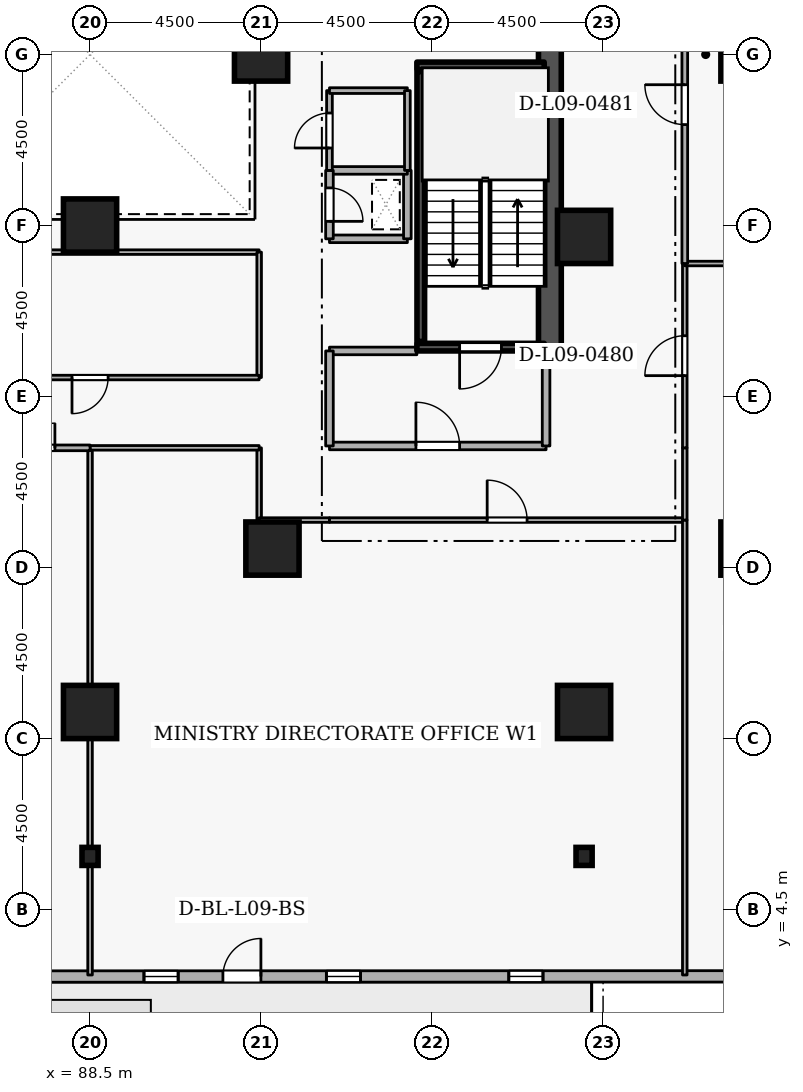
"""IFC4 building model, lengths in metres.
Left out: names, types, materials, properties, quantities, classifications, styles, units other than length and angle.
Written with IfcOpenShell. Run it as: python <this file> out.ifc"""

import sys

from ifc_helpers import new_model, si_unit, direction, frame, frame_2d, origin, origin_2d, place, context, subcontext, project, spatial, rectangle, i_section, extrude, element, fill, save


model = new_model("IFC4")
c1 = context("Model", 3, precision=1e-05, world=origin(), true_north=direction((0.0, 1.0)))
c2 = subcontext(c1, "Body", "Model", "MODEL_VIEW")
j1 = project(units=[si_unit("LENGTHUNIT", "METRE"), si_unit("PLANEANGLEUNIT", "RADIAN")], contexts=[c1])
p1 = place(None, origin())
s1 = spatial("IfcSite", under=j1, at=p1, CompositionType="ELEMENT")
p2 = place(p1, origin())
s2 = spatial("IfcBuilding", under=s1, at=p2, CompositionType="ELEMENT")
p3 = place(p2, frame((0.0, 0.0, 38.7)))
s3 = spatial("IfcBuildingStorey", under=s2, at=p3, CompositionType="ELEMENT", Elevation=38.7)
p4 = place(p3, frame((100.6, 19.2, 0.0), z_axis=(0.0, 0.0, 1.0), x_axis=(0.0, 1.0, 0.0)))
e1 = element("IfcWall", 1, at=p4, inside=s3, PredefinedType="SHEAR", context=c2, shape_type="SweptSolid", body=[
    extrude(rectangle(XDim=15.6, YDim=0.6, at=frame_2d((7.8, 0.0))), origin(), (0.0, 0.0, 1.0), 3.6),
])
for number, where, z_axis, x_axis in (
    (2, (105.8, 14.0, 0.0), (0.0, 0.0, 1.0), (1.0, 0.0, 0.0)),
    (3, (105.8, 27.0, 0.0), (0.0, 0.0, 1.0), (1.0, 0.0, 0.0)),
    (4, (101.5, 9.7, 0.0), (0.0, 0.0, 1.0), (1.0, 0.0, 0.0)),
    (5, (88.5, 9.7, 0.0), (0.0, 0.0, 1.0), (1.0, 0.0, 0.0)),
    (6, (93.3, 14.0, 0.0), (0.0, 0.0, 1.0), (1.0, 0.0, 0.0)),
    (7, (101.5, 22.2, 0.0), (0.0, 0.0, 1.0), (1.0, 0.0, 0.0)),
    (8, (93.0, 27.0, 0.0), (0.0, 0.0, 1.0), (1.0, 0.0, 0.0)),
    (9, (88.5, 22.5, 0.0), (0.0, 0.0, 1.0), (1.0, 0.0, 0.0)),
):
    element("IfcColumn", number, at=place(p3, frame(where, z_axis=z_axis, x_axis=x_axis)), inside=s3, PredefinedType="COLUMN", context=c2, shape_type="SweptSolid", body=[
        extrude(rectangle(XDim=1.4, YDim=1.4, at=origin_2d()), origin(), (0.0, 0.0, 1.0), 3.6),
    ])
for number, where, z_axis, x_axis in (
    (10, (101.5, 5.9, 0.0), (0.0, 0.0, 1.0), (1.0, 0.0, 0.0)),
    (11, (88.5, 5.9, 0.0), (0.0, 0.0, 1.0), (1.0, 0.0, 0.0)),
):
    element("IfcColumn", number, at=place(p3, frame(where, z_axis=z_axis, x_axis=x_axis)), inside=s3, PredefinedType="COLUMN", context=c2, shape_type="SweptSolid", body=[
        extrude(i_section(OverallWidth=0.424, OverallDepth=0.475, WebThickness=0.048, FlangeThickness=0.077, FilletRadius=0.015, at=origin_2d()), origin(), (0.0, 0.0, 1.0), 3.6),
    ])
p5 = place(p3, frame((72.819, 2.735, 0.0), z_axis=(0.0, 0.0, 1.0), x_axis=(0.999999969775, 0.000245864205, 0.0)))
e12 = element("IfcWall", 12, at=p5, inside=s3, PredefinedType="STANDARD", context=c2, shape_type="SweptSolid", body=[
    extrude(rectangle(XDim=34.755, YDim=0.3, at=frame_2d((17.377, 0.0))), origin(), (0.0, 0.0, 1.0), 2.7),
])
p6 = place(p5, frame((19.177, 0.0, 0.0)))
e13 = element("IfcOpeningElement", 13, at=p6, cuts=e12, PredefinedType="OPENING", context=c2, shape_type="SweptSolid", body=[
    extrude(rectangle(XDim=1.0, YDim=2.08, at=frame_2d((0.5, 1.04))), frame((0.0, 0.16, 0.0), z_axis=(0.0, -1.0, 0.0), x_axis=(1.0, 0.0, 0.0)), (0.0, 0.0, 1.0), 0.32),
])
p7 = place(p5, frame((2.7, 0.0, 0.72)))
e14 = element("IfcOpeningElement", 14, at=p7, cuts=e12, PredefinedType="OPENING", context=c2, shape_type="SweptSolid", body=[
    extrude(rectangle(XDim=0.9, YDim=1.75, at=frame_2d((0.45, 0.875))), frame((0.0, 0.16, 0.0), z_axis=(0.0, -1.0, 0.0), x_axis=(1.0, 0.0, 0.0)), (0.0, 0.0, 1.0), 0.32),
])
p8 = place(p5, frame((7.5, 0.0, 0.72)))
e15 = element("IfcOpeningElement", 15, at=p8, cuts=e12, PredefinedType="OPENING", context=c2, shape_type="SweptSolid", body=[
    extrude(rectangle(XDim=0.9, YDim=1.75, at=frame_2d((0.45, 0.875))), frame((0.0, 0.16, 0.0), z_axis=(0.0, -1.0, 0.0), x_axis=(1.0, 0.0, 0.0)), (0.0, 0.0, 1.0), 0.32),
])
p9 = place(p5, frame((17.1, 0.0, 0.72)))
e16 = element("IfcOpeningElement", 16, at=p9, cuts=e12, PredefinedType="OPENING", context=c2, shape_type="SweptSolid", body=[
    extrude(rectangle(XDim=0.9, YDim=1.75, at=frame_2d((0.45, 0.875))), frame((0.0, 0.16, 0.0), z_axis=(0.0, -1.0, 0.0), x_axis=(1.0, 0.0, 0.0)), (0.0, 0.0, 1.0), 0.32),
])
p10 = place(p5, frame((21.9, 0.0, 0.72)))
e17 = element("IfcOpeningElement", 17, at=p10, cuts=e12, PredefinedType="OPENING", context=c2, shape_type="SweptSolid", body=[
    extrude(rectangle(XDim=0.9, YDim=1.75, at=frame_2d((0.45, 0.875))), frame((0.0, 0.16, 0.0), z_axis=(0.0, -1.0, 0.0), x_axis=(1.0, 0.0, 0.0)), (0.0, 0.0, 1.0), 0.32),
])
p11 = place(p5, frame((26.7, 0.0, 0.72)))
e18 = element("IfcOpeningElement", 18, at=p11, cuts=e12, PredefinedType="OPENING", context=c2, shape_type="SweptSolid", body=[
    extrude(rectangle(XDim=0.9, YDim=1.75, at=frame_2d((0.45, 0.875))), frame((0.0, 0.16, 0.0), z_axis=(0.0, -1.0, 0.0), x_axis=(1.0, 0.0, 0.0)), (0.0, 0.0, 1.0), 0.32),
])
p12 = place(p3, frame((100.45, 19.3, 0.0), z_axis=(0.0, 0.0, 1.0), x_axis=(-1.0, 0.0, 0.0)))
e19 = element("IfcWall", 19, at=p12, inside=s3, PredefinedType="SHEAR", context=c2, shape_type="SweptSolid", body=[
    extrude(rectangle(XDim=3.35, YDim=0.2, at=frame_2d((1.675, 0.0))), origin(), (0.0, 0.0, 1.0), 3.6),
])
p13 = place(p12, frame((1.125, 0.0, 0.0)))
e20 = element("IfcOpeningElement", 20, at=p13, cuts=e19, PredefinedType="OPENING", context=c2, shape_type="SweptSolid", body=[
    extrude(rectangle(XDim=1.1, YDim=2.1, at=frame_2d((0.55, 1.05))), frame((0.0, 0.11, 0.0), z_axis=(0.0, -1.0, 0.0), x_axis=(1.0, 0.0, 0.0)), (0.0, 0.0, 1.0), 0.22),
])
p14 = place(p3, frame((97.1, 26.7, 0.0), z_axis=(0.0, 0.0, 1.0), x_axis=(1.0, 0.0, 0.0)))
e21 = element("IfcWall", 21, at=p14, inside=s3, PredefinedType="SHEAR", context=c2, shape_type="SweptSolid", body=[
    extrude(rectangle(XDim=3.35, YDim=0.2, at=frame_2d((1.675, 0.0))), origin(), (0.0, 0.0, 1.0), 3.6),
])
p15 = place(p3, frame((97.203, 26.55, 0.0), z_axis=(0.0, 0.0, 1.0), x_axis=(0.0, -1.0, 0.0)))
e22 = element("IfcWall", 22, at=p15, inside=s3, PredefinedType="SHEAR", context=c2, shape_type="SweptSolid", body=[
    extrude(rectangle(XDim=7.1, YDim=0.2, at=frame_2d((3.55, 0.0))), origin(), (0.0, 0.0, 1.0), 3.6),
])
p16 = place(p3, frame((94.8, 16.7, 0.0), z_axis=(0.0, 0.0, 1.0), x_axis=(1.0, 0.0, 0.0)))
e23 = element("IfcWall", 23, at=p16, inside=s3, PredefinedType="STANDARD", context=c2, shape_type="SweptSolid", body=[
    extrude(rectangle(XDim=5.7, YDim=0.2, at=frame_2d((2.85, 0.0))), origin(), (0.0, 0.0, 1.0), 3.34),
])
p17 = place(p16, frame((2.275, 0.0, 0.0)))
e24 = element("IfcOpeningElement", 24, at=p17, cuts=e23, PredefinedType="OPENING", context=c2, shape_type="SweptSolid", body=[
    extrude(rectangle(XDim=1.15, YDim=2.1, at=frame_2d((0.575, 1.05))), frame((0.0, 0.11, 0.0), z_axis=(0.0, -1.0, 0.0), x_axis=(1.0, 0.0, 0.0)), (0.0, 0.0, 1.0), 0.22),
])
p18 = place(p3, frame((100.5, 16.7, 0.0), z_axis=(0.0, 0.0, 1.0), x_axis=(0.0, 1.0, 0.0)))
e25 = element("IfcWall", 25, at=p18, inside=s3, PredefinedType="STANDARD", context=c2, shape_type="SweptSolid", body=[
    extrude(rectangle(XDim=2.5, YDim=0.2, at=frame_2d((1.25, 0.0))), origin(), (0.0, 0.0, 1.0), 3.34),
])
p19 = place(p3, frame((97.1, 19.2, 0.0), z_axis=(0.0, 0.0, 1.0), x_axis=(-1.0, 0.0, 0.0)))
e26 = element("IfcWall", 26, at=p19, inside=s3, PredefinedType="STANDARD", context=c2, shape_type="SweptSolid", body=[
    extrude(rectangle(XDim=2.3, YDim=0.2, at=frame_2d((1.15, 0.0))), origin(), (0.0, 0.0, 1.0), 2.545),
])
p20 = place(p3, frame((94.8, 19.2, 0.0), z_axis=(0.0, 0.0, 1.0), x_axis=(0.0, -1.0, 0.0)))
e27 = element("IfcWall", 27, at=p20, inside=s3, PredefinedType="STANDARD", context=c2, shape_type="SweptSolid", body=[
    extrude(rectangle(XDim=2.5, YDim=0.2, at=frame_2d((1.25, 0.0))), origin(), (0.0, 0.0, 1.0), 3.34),
])
p21 = place(p3, frame((94.8, 22.15, 0.0), z_axis=(0.0, 0.0, 1.0), x_axis=(1.0, 0.0, 0.0)))
e28 = element("IfcWall", 28, at=p21, inside=s3, PredefinedType="STANDARD", context=c2, shape_type="SweptSolid", body=[
    extrude(rectangle(XDim=2.05, YDim=0.2, at=frame_2d((1.025, 0.0))), origin(), (0.0, 0.0, 1.0), 3.34),
])
p22 = place(p3, frame((96.85, 22.15, 0.0), z_axis=(0.0, 0.0, 1.0), x_axis=(0.0, 1.0, 0.0)))
e29 = element("IfcWall", 29, at=p22, inside=s3, PredefinedType="STANDARD", context=c2, shape_type="SweptSolid", body=[
    extrude(rectangle(XDim=1.8, YDim=0.2, at=frame_2d((0.9, 0.0))), origin(), (0.0, 0.0, 1.0), 3.34),
])
p23 = place(p3, frame((96.85, 23.95, 0.0), z_axis=(0.0, 0.0, 1.0), x_axis=(-1.0, 0.0, 0.0)))
e30 = element("IfcWall", 30, at=p23, inside=s3, PredefinedType="STANDARD", context=c2, shape_type="SweptSolid", body=[
    extrude(rectangle(XDim=2.05, YDim=0.2, at=frame_2d((1.025, 0.0))), origin(), (0.0, 0.0, 1.0), 3.34),
])
p24 = place(p3, frame((94.8, 23.95, 0.0), z_axis=(0.0, 0.0, 1.0), x_axis=(0.0, -1.0, 0.0)))
e31 = element("IfcWall", 31, at=p24, inside=s3, PredefinedType="STANDARD", context=c2, shape_type="SweptSolid", body=[
    extrude(rectangle(XDim=1.8, YDim=0.2, at=frame_2d((0.9, 0.0))), origin(), (0.0, 0.0, 1.0), 3.34),
])
p25 = place(p24, frame((0.46, 0.0, 0.0)))
e32 = element("IfcOpeningElement", 32, at=p25, cuts=e31, PredefinedType="OPENING", context=c2, shape_type="SweptSolid", body=[
    extrude(rectangle(XDim=0.88, YDim=2.04, at=frame_2d((0.44, 1.02))), frame((0.0, 0.11, 0.0), z_axis=(0.0, -1.0, 0.0), x_axis=(1.0, 0.0, 0.0)), (0.0, 0.0, 1.0), 0.22),
])
p26 = place(p3, frame((94.8, 23.95, 0.0), z_axis=(0.0, 0.0, 1.0), x_axis=(0.0, 1.0, 0.0)))
e33 = element("IfcWall", 33, at=p26, inside=s3, PredefinedType="PARTITIONING", context=c2, shape_type="SweptSolid", body=[
    extrude(rectangle(XDim=2.1, YDim=0.15, at=frame_2d((1.05, 0.0))), origin(), (0.0, 0.0, 1.0), 3.34),
])
p27 = place(p26, frame((0.59, 0.0, 0.0)))
e34 = element("IfcOpeningElement", 34, at=p27, cuts=e33, PredefinedType="OPENING", context=c2, shape_type="SweptSolid", body=[
    extrude(rectangle(XDim=0.92, YDim=2.08, at=frame_2d((0.46, 1.04))), frame((0.0, 0.085, 0.0), z_axis=(0.0, -1.0, 0.0), x_axis=(1.0, 0.0, 0.0)), (0.0, 0.0, 1.0), 0.17),
])
p28 = place(p3, frame((94.8, 26.05, 0.0), z_axis=(0.0, 0.0, 1.0), x_axis=(1.0, 0.0, 0.0)))
e35 = element("IfcWall", 35, at=p28, inside=s3, PredefinedType="PARTITIONING", context=c2, shape_type="SweptSolid", body=[
    extrude(rectangle(XDim=2.05, YDim=0.15, at=frame_2d((1.025, 0.0))), origin(), (0.0, 0.0, 1.0), 3.34),
])
p29 = place(p3, frame((96.85, 26.05, 0.0), z_axis=(0.0, 0.0, 1.0), x_axis=(0.0, -1.0, 0.0)))
e36 = element("IfcWall", 36, at=p29, inside=s3, PredefinedType="PARTITIONING", context=c2, shape_type="SweptSolid", body=[
    extrude(rectangle(XDim=2.1, YDim=0.15, at=frame_2d((1.05, 0.0))), origin(), (0.0, 0.0, 1.0), 3.34),
])
p30 = place(p3, frame((92.95, 16.65, 0.0), z_axis=(0.0, 0.0, 1.0), x_axis=(0.0, -1.0, 0.0)))
e37 = element("IfcWall", 37, at=p30, inside=s3, PredefinedType="PARTITIONING", context=c2, shape_type="SweptSolid", body=[
    extrude(rectangle(XDim=1.9, YDim=0.12, at=frame_2d((0.95, 0.0))), origin(), (0.0, 0.0, 1.0), 3.34),
])
p31 = place(p3, frame((92.95, 14.75, 0.0), z_axis=(0.0, 0.0, 1.0), x_axis=(1.0, 0.0, 0.0)))
e38 = element("IfcWall", 38, at=p31, inside=s3, PredefinedType="PARTITIONING", context=c2, shape_type="SweptSolid", body=[
    extrude(rectangle(XDim=1.85, YDim=0.12, at=frame_2d((0.925, 0.0))), origin(), (0.0, 0.0, 1.0), 3.34),
])
p32 = place(p3, frame((94.8, 14.75, 0.0), z_axis=(0.0, 0.0, 1.0), x_axis=(1.0, 0.0, 0.0)))
e39 = element("IfcWall", 39, at=p32, inside=s3, PredefinedType="PARTITIONING", context=c2, shape_type="SweptSolid", body=[
    extrude(rectangle(XDim=9.35, YDim=0.12, at=frame_2d((4.675, 0.0))), origin(), (0.0, 0.0, 1.0), 3.34),
])
p33 = place(p32, frame((4.15, 0.0, 0.0)))
e40 = element("IfcOpeningElement", 40, at=p33, cuts=e39, PredefinedType="OPENING", context=c2, shape_type="SweptSolid", body=[
    extrude(rectangle(XDim=1.05, YDim=2.1, at=frame_2d((0.525, 1.05))), frame((0.0, 0.07, 0.0), z_axis=(0.0, -1.0, 0.0), x_axis=(1.0, 0.0, 0.0)), (0.0, 0.0, 1.0), 0.14),
])
p34 = place(p3, frame((104.15, 14.75, 0.0), z_axis=(0.0, 0.0, 1.0), x_axis=(0.0, -1.0, 0.0)))
e41 = element("IfcWall", 41, at=p34, inside=s3, PredefinedType="PARTITIONING", context=c2, shape_type="SweptSolid", body=[
    extrude(rectangle(XDim=11.97, YDim=0.12, at=frame_2d((5.985, 0.0))), origin(), (0.0, 0.0, 1.0), 3.34),
])
p35 = place(p3, frame((88.5, 2.78, 0.0), z_axis=(0.0, 0.0, 1.0), x_axis=(0.0, 1.0, 0.0)))
e42 = element("IfcWall", 42, at=p35, inside=s3, PredefinedType="PARTITIONING", context=c2, shape_type="SweptSolid", body=[
    extrude(rectangle(XDim=13.87, YDim=0.12, at=frame_2d((6.935, 0.0))), origin(), (0.0, 0.0, 1.0), 2.882),
])
p36 = place(p3, frame((88.5, 16.65, 0.0), z_axis=(0.0, 0.0, 1.0), x_axis=(1.0, 0.0, 0.0)))
e43 = element("IfcWall", 43, at=p36, inside=s3, PredefinedType="PARTITIONING", context=c2, shape_type="SweptSolid", body=[
    extrude(rectangle(XDim=4.45, YDim=0.12, at=frame_2d((2.225, 0.0))), origin(), (0.0, 0.0, 1.0), 3.34),
])
p37 = place(p3, frame((85.35, 16.65, 0.0), z_axis=(0.0, 0.0, 1.0), x_axis=(1.0, 0.0, 0.0)))
e44 = element("IfcWall", 44, at=p37, inside=s3, PredefinedType="PARTITIONING", context=c2, shape_type="SweptSolid", body=[
    extrude(rectangle(XDim=3.15, YDim=0.15, at=frame_2d((1.575, 0.0))), origin(), (0.0, 0.0, 1.0), 3.34),
])
p38 = place(p37, frame((0.925, 0.0, 0.0)))
e45 = element("IfcOpeningElement", 45, at=p38, cuts=e44, PredefinedType="OPENING", context=c2, shape_type="SweptSolid", body=[
    extrude(rectangle(XDim=1.3, YDim=2.12, at=frame_2d((0.65, 1.06))), frame((0.0, 0.085, 0.0), z_axis=(0.0, -1.0, 0.0), x_axis=(1.0, 0.0, 0.0)), (0.0, 0.0, 1.0), 0.17),
])
p39 = place(p3, frame((84.05, 21.8, 0.0), z_axis=(0.0, 0.0, 1.0), x_axis=(1.0, 0.0, 0.0)))
e46 = element("IfcWall", 46, at=p39, inside=s3, PredefinedType="PARTITIONING", context=c2, shape_type="SweptSolid", body=[
    extrude(rectangle(XDim=8.9, YDim=0.12, at=frame_2d((4.45, 0.0))), origin(), (0.0, 0.0, 1.0), 3.34),
])
p40 = place(p3, frame((92.95, 21.8, 0.0), z_axis=(0.0, 0.0, 1.0), x_axis=(0.0, -1.0, 0.0)))
e47 = element("IfcWall", 47, at=p40, inside=s3, PredefinedType="PARTITIONING", context=c2, shape_type="SweptSolid", body=[
    extrude(rectangle(XDim=3.3, YDim=0.12, at=frame_2d((1.65, 0.0))), origin(), (0.0, 0.0, 1.0), 3.34),
])
p41 = place(p3, frame((92.95, 18.5, 0.0), z_axis=(0.0, 0.0, 1.0), x_axis=(-1.0, 0.0, 0.0)))
e48 = element("IfcWall", 48, at=p41, inside=s3, PredefinedType="PARTITIONING", context=c2, shape_type="SweptSolid", body=[
    extrude(rectangle(XDim=8.9, YDim=0.12, at=frame_2d((4.45, 0.0))), origin(), (0.0, 0.0, 1.0), 3.34),
])
p42 = place(p41, frame((3.975, 0.0, 0.0)))
e49 = element("IfcOpeningElement", 49, at=p42, cuts=e48, PredefinedType="OPENING", context=c2, shape_type="SweptSolid", body=[
    extrude(rectangle(XDim=0.95, YDim=2.1, at=frame_2d((0.475, 1.05))), frame((0.0, 0.07, 0.0), z_axis=(0.0, -1.0, 0.0), x_axis=(1.0, 0.0, 0.0)), (0.0, 0.0, 1.0), 0.14),
])
p43 = place(p3, frame((104.15, 14.75, 0.0), z_axis=(0.0, 0.0, 1.0), x_axis=(0.0, 1.0, 0.0)))
e50 = element("IfcWall", 50, at=p43, inside=s3, PredefinedType="PARTITIONING", context=c2, shape_type="SweptSolid", body=[
    extrude(rectangle(XDim=1.9, YDim=0.12, at=frame_2d((0.95, 0.0))), origin(), (0.0, 0.0, 1.0), 3.34),
])
p44 = place(p3, frame((104.15, 16.65, 0.0), z_axis=(0.0, 0.0, 1.0), x_axis=(0.0, 1.0, 0.0)))
e51 = element("IfcWall", 51, at=p44, inside=s3, PredefinedType="PARTITIONING", context=c2, shape_type="SweptSolid", body=[
    extrude(rectangle(XDim=4.85, YDim=0.12, at=frame_2d((2.425, 0.0))), origin(), (0.0, 0.0, 1.0), 3.34),
])
p45 = place(p44, frame((1.9, 0.0, 0.0)))
e52 = element("IfcOpeningElement", 52, at=p45, cuts=e51, PredefinedType="OPENING", context=c2, shape_type="SweptSolid", body=[
    extrude(rectangle(XDim=1.05, YDim=2.1, at=frame_2d((0.525, 1.05))), frame((0.0, 0.07, 0.0), z_axis=(0.0, -1.0, 0.0), x_axis=(1.0, 0.0, 0.0)), (0.0, 0.0, 1.0), 0.14),
])
p46 = place(p3, frame((104.15, 21.5, 0.0), z_axis=(0.0, 0.0, 1.0), x_axis=(1.0, 0.0, 0.0)))
e53 = element("IfcWall", 53, at=p46, inside=s3, PredefinedType="PARTITIONING", context=c2, shape_type="SweptSolid", body=[
    extrude(rectangle(XDim=8.57, YDim=0.12, at=frame_2d((4.285, 0.0))), origin(), (0.0, 0.0, 1.0), 3.34),
])
p47 = place(p3, frame((104.15, 21.5, 0.0), z_axis=(0.0, 0.0, 1.0), x_axis=(0.0, 1.0, 0.0)))
e54 = element("IfcWall", 54, at=p47, inside=s3, PredefinedType="PARTITIONING", context=c2, shape_type="SweptSolid", body=[
    extrude(rectangle(XDim=11.0, YDim=0.15, at=frame_2d((5.5, 0.0))), origin(), (0.0, 0.0, 1.0), 3.34),
])
p48 = place(p47, frame((3.655, 0.0, 0.0)))
e55 = element("IfcOpeningElement", 55, at=p48, cuts=e54, PredefinedType="OPENING", context=c2, shape_type="SweptSolid", body=[
    extrude(rectangle(XDim=1.05, YDim=2.1, at=frame_2d((0.525, 1.05))), frame((0.0, 0.085, 0.0), z_axis=(0.0, -1.0, 0.0), x_axis=(1.0, 0.0, 0.0)), (0.0, 0.0, 1.0), 0.17),
])
p49 = place(p6, origin())
e56 = element("IfcDoor", 56, at=p49, inside=s3, OperationType="SINGLE_SWING_RIGHT", PredefinedType="DOOR", context=c2, shape_type="SweptSolid", body=[
    extrude(rectangle(XDim=1.0, YDim=2.08, at=frame_2d((0.5, 1.04))), frame((0.0, 0.025, 0.0), z_axis=(0.0, -1.0, 0.0), x_axis=(1.0, 0.0, 0.0)), (0.0, 0.0, 1.0), 0.05),
])
fill(e13, e56)
p50 = place(p9, origin())
e57 = element("IfcWindow", 57, at=p50, inside=s3, PartitioningType="SINGLE_PANEL", PredefinedType="WINDOW", context=c2, shape_type="SweptSolid", body=[
    extrude(rectangle(XDim=0.9, YDim=1.75, at=frame_2d((0.45, 0.875))), frame((0.0, 0.03, 0.0), z_axis=(0.0, -1.0, 0.0), x_axis=(1.0, 0.0, 0.0)), (0.0, 0.0, 1.0), 0.06),
])
fill(e16, e57)
p51 = place(p10, origin())
e58 = element("IfcWindow", 58, at=p51, inside=s3, PartitioningType="SINGLE_PANEL", PredefinedType="WINDOW", context=c2, shape_type="SweptSolid", body=[
    extrude(rectangle(XDim=0.9, YDim=1.75, at=frame_2d((0.45, 0.875))), frame((0.0, 0.03, 0.0), z_axis=(0.0, -1.0, 0.0), x_axis=(1.0, 0.0, 0.0)), (0.0, 0.0, 1.0), 0.06),
])
fill(e17, e58)
p52 = place(p11, origin())
e59 = element("IfcWindow", 59, at=p52, inside=s3, PartitioningType="SINGLE_PANEL", PredefinedType="WINDOW", context=c2, shape_type="SweptSolid", body=[
    extrude(rectangle(XDim=0.9, YDim=1.75, at=frame_2d((0.45, 0.875))), frame((0.0, 0.03, 0.0), z_axis=(0.0, -1.0, 0.0), x_axis=(1.0, 0.0, 0.0)), (0.0, 0.0, 1.0), 0.06),
])
fill(e18, e59)
p53 = place(p13, origin())
e60 = element("IfcDoor", 60, at=p53, inside=s3, OperationType="SINGLE_SWING_RIGHT", PredefinedType="DOOR", context=c2, shape_type="SweptSolid", body=[
    extrude(rectangle(XDim=1.1, YDim=2.1, at=frame_2d((0.55, 1.05))), frame((0.0, 0.025, 0.0), z_axis=(0.0, -1.0, 0.0), x_axis=(1.0, 0.0, 0.0)), (0.0, 0.0, 1.0), 0.05),
])
fill(e20, e60)
p54 = place(p17, origin())
e61 = element("IfcDoor", 61, at=p54, inside=s3, OperationType="SINGLE_SWING_LEFT", PredefinedType="DOOR", context=c2, shape_type="SweptSolid", body=[
    extrude(rectangle(XDim=1.15, YDim=2.1, at=frame_2d((0.575, 1.05))), frame((0.0, 0.025, 0.0), z_axis=(0.0, -1.0, 0.0), x_axis=(1.0, 0.0, 0.0)), (0.0, 0.0, 1.0), 0.05),
])
fill(e24, e61)
p55 = place(p25, origin())
e62 = element("IfcDoor", 62, at=p55, inside=s3, OperationType="SINGLE_SWING_RIGHT", PredefinedType="DOOR", context=c2, shape_type="SweptSolid", body=[
    extrude(rectangle(XDim=0.88, YDim=2.04, at=frame_2d((0.44, 1.02))), frame((0.0, 0.025, 0.0), z_axis=(0.0, -1.0, 0.0), x_axis=(1.0, 0.0, 0.0)), (0.0, 0.0, 1.0), 0.05),
])
fill(e32, e62)
p56 = place(p27, origin())
e63 = element("IfcDoor", 63, at=p56, inside=s3, OperationType="SINGLE_SWING_LEFT", PredefinedType="DOOR", context=c2, shape_type="SweptSolid", body=[
    extrude(rectangle(XDim=0.92, YDim=2.08, at=frame_2d((0.46, 1.04))), frame((0.0, 0.025, 0.0), z_axis=(0.0, -1.0, 0.0), x_axis=(1.0, 0.0, 0.0)), (0.0, 0.0, 1.0), 0.05),
])
fill(e34, e63)
p57 = place(p33, origin())
e64 = element("IfcDoor", 64, at=p57, inside=s3, OperationType="SINGLE_SWING_LEFT", PredefinedType="DOOR", context=c2, shape_type="SweptSolid", body=[
    extrude(rectangle(XDim=1.05, YDim=2.1, at=frame_2d((0.525, 1.05))), frame((0.0, 0.025, 0.0), z_axis=(0.0, -1.0, 0.0), x_axis=(1.0, 0.0, 0.0)), (0.0, 0.0, 1.0), 0.05),
])
fill(e40, e64)
p58 = place(p38, origin())
e65 = element("IfcDoor", 65, at=p58, inside=s3, OperationType="DOUBLE_DOOR_SINGLE_SWING", PredefinedType="DOOR", context=c2, shape_type="SweptSolid", body=[
    extrude(rectangle(XDim=1.3, YDim=2.12, at=frame_2d((0.65, 1.06))), frame((0.0, 0.025, 0.0), z_axis=(0.0, -1.0, 0.0), x_axis=(1.0, 0.0, 0.0)), (0.0, 0.0, 1.0), 0.05),
])
fill(e45, e65)
p59 = place(p42, origin())
e66 = element("IfcDoor", 66, at=p59, inside=s3, OperationType="SINGLE_SWING_RIGHT", PredefinedType="DOOR", context=c2, shape_type="SweptSolid", body=[
    extrude(rectangle(XDim=0.95, YDim=2.1, at=frame_2d((0.475, 1.05))), frame((0.0, 0.025, 0.0), z_axis=(0.0, -1.0, 0.0), x_axis=(1.0, 0.0, 0.0)), (0.0, 0.0, 1.0), 0.05),
])
fill(e49, e66)
p60 = place(p45, origin())
e67 = element("IfcDoor", 67, at=p60, inside=s3, OperationType="SINGLE_SWING_LEFT", PredefinedType="DOOR", context=c2, shape_type="SweptSolid", body=[
    extrude(rectangle(XDim=1.05, YDim=2.1, at=frame_2d((0.525, 1.05))), frame((0.0, 0.025, 0.0), z_axis=(0.0, -1.0, 0.0), x_axis=(1.0, 0.0, 0.0)), (0.0, 0.0, 1.0), 0.05),
])
fill(e52, e67)
p61 = place(p48, origin())
e68 = element("IfcDoor", 68, at=p61, inside=s3, OperationType="SINGLE_SWING_RIGHT", PredefinedType="DOOR", context=c2, shape_type="SweptSolid", body=[
    extrude(rectangle(XDim=1.05, YDim=2.1, at=frame_2d((0.525, 1.05))), frame((0.0, 0.025, 0.0), z_axis=(0.0, -1.0, 0.0), x_axis=(1.0, 0.0, 0.0)), (0.0, 0.0, 1.0), 0.05),
])
fill(e55, e68)
save(model, sys.argv[1])
